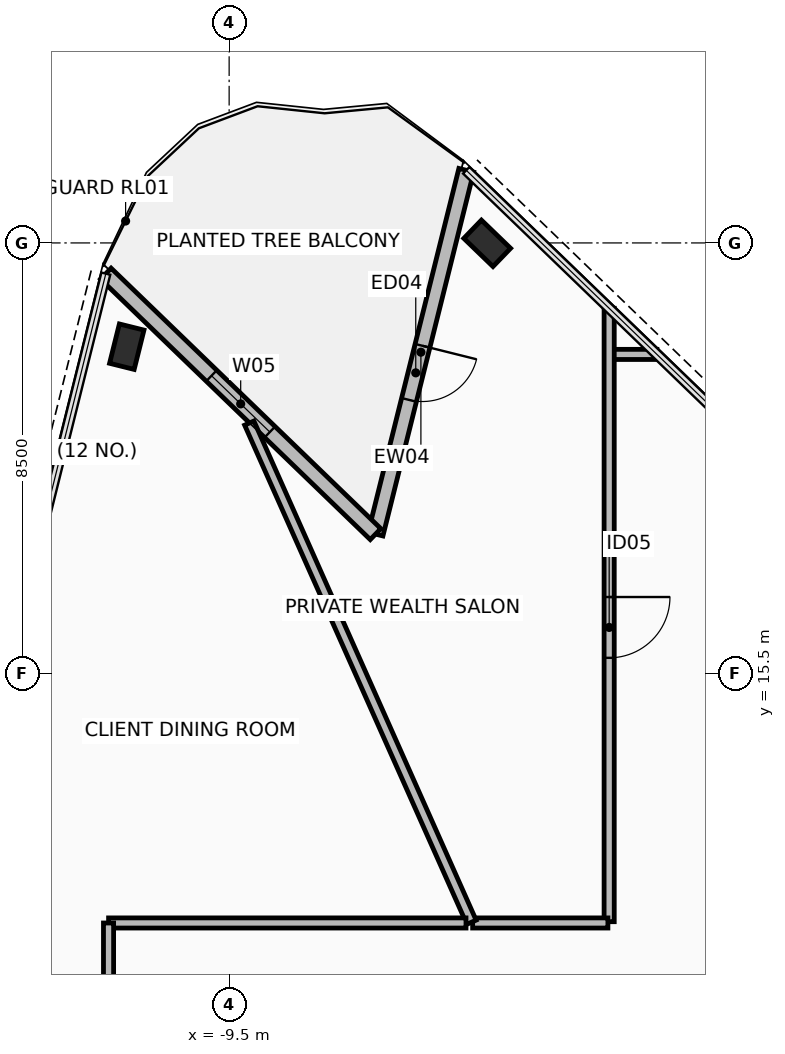
"""IFC4 building model, lengths in metres.
Left out: names, types, materials, properties, quantities, classifications, styles, units other than length and angle.
Written with IfcOpenShell. Run it as: python <this file> out.ifc"""

import sys

from ifc_helpers import new_model, si_unit, direction, frame, frame_2d, origin, origin_2d, place, context, subcontext, project, spatial, rectangle, hollow_rectangle, extrude, element, fill, save


model = new_model("IFC4")
c1 = context("Model", 3, precision=1e-05, world=origin(), true_north=direction((0.0, 1.0)))
c2 = subcontext(c1, "Body", "Model", "MODEL_VIEW")
j1 = project(units=[si_unit("LENGTHUNIT", "METRE"), si_unit("PLANEANGLEUNIT", "RADIAN")], contexts=[c1])
p1 = place(None, origin())
s1 = spatial("IfcSite", under=j1, at=p1, CompositionType="ELEMENT")
p2 = place(p1, origin())
s2 = spatial("IfcBuilding", under=s1, at=p2, CompositionType="ELEMENT")
p3 = place(p2, frame((0.0, 0.0, 104.1)))
s3 = spatial("IfcBuildingStorey", under=s2, at=p3, CompositionType="ELEMENT", Elevation=104.1)
for number, where, z_axis, x_axis in (
    (1, (-11.52, 21.952, 0.0), (0.0, 0.0, 1.0), (0.242, 0.97, 0.0)),
    (2, (-4.407, 23.992, 0.0), (0.0, 0.0, 1.0), (-0.719, 0.695, 0.0)),
):
    element("IfcColumn", number, at=place(p3, frame(where, z_axis=z_axis, x_axis=x_axis)), inside=s3, PredefinedType="COLUMN", context=c2, shape_type="SweptSolid", body=[
        extrude(hollow_rectangle(XDim=0.5, YDim=0.8, WallThickness=0.04, at=origin_2d()), origin(), (0.0, 0.0, 1.0), 3.6),
    ])
p4 = place(p3, frame((-4.82, 25.434, 0.0), z_axis=(0.0, 0.0, 1.0), x_axis=(-0.241930078207, -0.970293686086, 0.0)))
e3 = element("IfcWall", 3, at=p4, inside=s3, PredefinedType="STANDARD", context=c2, shape_type="SweptSolid", body=[
    extrude(rectangle(XDim=7.4, YDim=0.3, at=frame_2d((3.7, 0.0))), origin(), (0.0, 0.0, 1.0), 2.605),
])
p5 = place(p4, frame((3.57, 0.0, 0.0)))
e4 = element("IfcOpeningElement", 4, at=p5, cuts=e3, PredefinedType="OPENING", context=c2, shape_type="SweptSolid", body=[
    extrude(rectangle(XDim=1.1, YDim=2.2, at=frame_2d((0.55, 1.1))), frame((0.0, 0.16, 0.0), z_axis=(0.0, -1.0, 0.0), x_axis=(1.0, 0.0, 0.0)), (0.0, 0.0, 1.0), 0.32),
])
p6 = place(p3, frame((-6.611, 18.254, 0.0), z_axis=(0.0, 0.0, 1.0), x_axis=(-0.719321869339, 0.694676938073, 0.0)))
e5 = element("IfcWall", 5, at=p6, inside=s3, PredefinedType="STANDARD", context=c2, shape_type="SweptSolid", body=[
    extrude(rectangle(XDim=7.4, YDim=0.3, at=frame_2d((3.7, 0.0))), origin(), (0.0, 0.0, 1.0), 2.605),
])
p7 = place(p6, frame((2.9, 0.0, 0.25)))
e6 = element("IfcOpeningElement", 6, at=p7, cuts=e5, PredefinedType="OPENING", context=c2, shape_type="SweptSolid", body=[
    extrude(rectangle(XDim=1.6, YDim=2.2, at=frame_2d((0.8, 1.1))), frame((0.0, 0.16, 0.0), z_axis=(0.0, -1.0, 0.0), x_axis=(1.0, 0.0, 0.0)), (0.0, 0.0, 1.0), 0.32),
])
p8 = place(p3, frame((-1.057, 21.8, 0.0), z_axis=(0.0, 0.0, 1.0), x_axis=(-1.0, 0.0, 0.0)))
e7 = element("IfcWall", 7, at=p8, inside=s3, PredefinedType="PARTITIONING", context=c2, shape_type="SweptSolid", body=[
    extrude(rectangle(XDim=0.942, YDim=0.2, at=frame_2d((0.471, 0.0))), origin(), (0.0, 0.0, 1.0), 2.605),
])
p9 = place(p3, frame((-2.0, 22.71, 0.0), z_axis=(0.0, 0.0, 1.0), x_axis=(0.0, -1.0, 0.0)))
e8 = element("IfcWall", 8, at=p9, inside=s3, PredefinedType="PARTITIONING", context=c2, shape_type="SweptSolid", body=[
    extrude(rectangle(XDim=12.105, YDim=0.2, at=frame_2d((6.053, 0.0))), origin(), (0.0, 0.0, 1.0), 2.605),
])
p10 = place(p9, frame((5.698, 0.0, 0.0)))
e9 = element("IfcOpeningElement", 9, at=p10, cuts=e8, PredefinedType="OPENING", context=c2, shape_type="SweptSolid", body=[
    extrude(rectangle(XDim=1.2, YDim=2.15, at=frame_2d((0.6, 1.075))), frame((0.0, 0.11, 0.0), z_axis=(0.0, -1.0, 0.0), x_axis=(1.0, 0.0, 0.0)), (0.0, 0.0, 1.0), 0.22),
])
p11 = place(p3, frame((-2.025, 10.58, 0.0), z_axis=(0.0, 0.0, 1.0), x_axis=(-1.0, 0.0, 0.0)))
e10 = element("IfcWall", 10, at=p11, inside=s3, PredefinedType="PARTITIONING", context=c2, shape_type="SweptSolid", body=[
    extrude(rectangle(XDim=2.669, YDim=0.2, at=frame_2d((1.335, 0.0))), origin(), (0.0, 0.0, 1.0), 3.41),
])
p12 = place(p3, frame((-4.717, 10.595, 0.0), z_axis=(0.0, 0.0, 1.0), x_axis=(-0.406751825839, 0.91353869769, 0.0)))
e11 = element("IfcWall", 11, at=p12, inside=s3, PredefinedType="PARTITIONING", context=c2, shape_type="SweptSolid", body=[
    extrude(rectangle(XDim=10.782, YDim=0.2, at=frame_2d((5.391, 0.0))), origin(), (0.0, 0.0, 1.0), 2.755),
])
p13 = place(p3, frame((-4.825, 10.58, 0.0), z_axis=(0.0, 0.0, 1.0), x_axis=(-1.0, 0.0, 0.0)))
e12 = element("IfcWall", 12, at=p13, inside=s3, PredefinedType="PARTITIONING", context=c2, shape_type="SweptSolid", body=[
    extrude(rectangle(XDim=7.054, YDim=0.2, at=frame_2d((3.527, 0.0))), origin(), (0.0, 0.0, 1.0), 2.755),
])
p14 = place(p3, frame((-11.88, 10.579, 0.0), z_axis=(0.0, 0.0, 1.0), x_axis=(0.0, -1.0, 0.0)))
e13 = element("IfcWall", 13, at=p14, inside=s3, PredefinedType="PARTITIONING", context=c2, shape_type="SweptSolid", body=[
    extrude(rectangle(XDim=8.654, YDim=0.2, at=frame_2d((4.327, 0.0))), origin(), (0.0, 0.0, 1.0), 2.805),
])
p15 = place(p14, frame((3.727, 0.0, 0.0)))
e14 = element("IfcOpeningElement", 14, at=p15, cuts=e13, PredefinedType="OPENING", context=c2, shape_type="SweptSolid", body=[
    extrude(rectangle(XDim=1.2, YDim=2.15, at=frame_2d((0.6, 1.075))), frame((0.0, 0.11, 0.0), z_axis=(0.0, -1.0, 0.0), x_axis=(1.0, 0.0, 0.0)), (0.0, 0.0, 1.0), 0.22),
])
p16 = place(p5, origin())
e15 = element("IfcDoor", 15, at=p16, inside=s3, OperationType="SINGLE_SWING_LEFT", PredefinedType="DOOR", context=c2, shape_type="SweptSolid", body=[
    extrude(rectangle(XDim=1.1, YDim=2.2, at=frame_2d((0.55, 1.1))), frame((0.0, 0.025, 0.0), z_axis=(0.0, -1.0, 0.0), x_axis=(1.0, 0.0, 0.0)), (0.0, 0.0, 1.0), 0.05),
])
fill(e4, e15)
p17 = place(p7, origin())
e16 = element("IfcWindow", 16, at=p17, inside=s3, PartitioningType="SINGLE_PANEL", PredefinedType="WINDOW", context=c2, shape_type="SweptSolid", body=[
    extrude(rectangle(XDim=1.6, YDim=2.2, at=frame_2d((0.8, 1.1))), frame((0.0, 0.03, 0.0), z_axis=(0.0, -1.0, 0.0), x_axis=(1.0, 0.0, 0.0)), (0.0, 0.0, 1.0), 0.06),
])
fill(e6, e16)
p18 = place(p10, origin())
e17 = element("IfcDoor", 17, at=p18, inside=s3, OperationType="SINGLE_SWING_LEFT", PredefinedType="DOOR", context=c2, shape_type="SweptSolid", body=[
    extrude(rectangle(XDim=1.2, YDim=2.15, at=frame_2d((0.6, 1.075))), frame((0.0, 0.025, 0.0), z_axis=(0.0, -1.0, 0.0), x_axis=(1.0, 0.0, 0.0)), (0.0, 0.0, 1.0), 0.05),
])
fill(e9, e17)
save(model, sys.argv[1])
